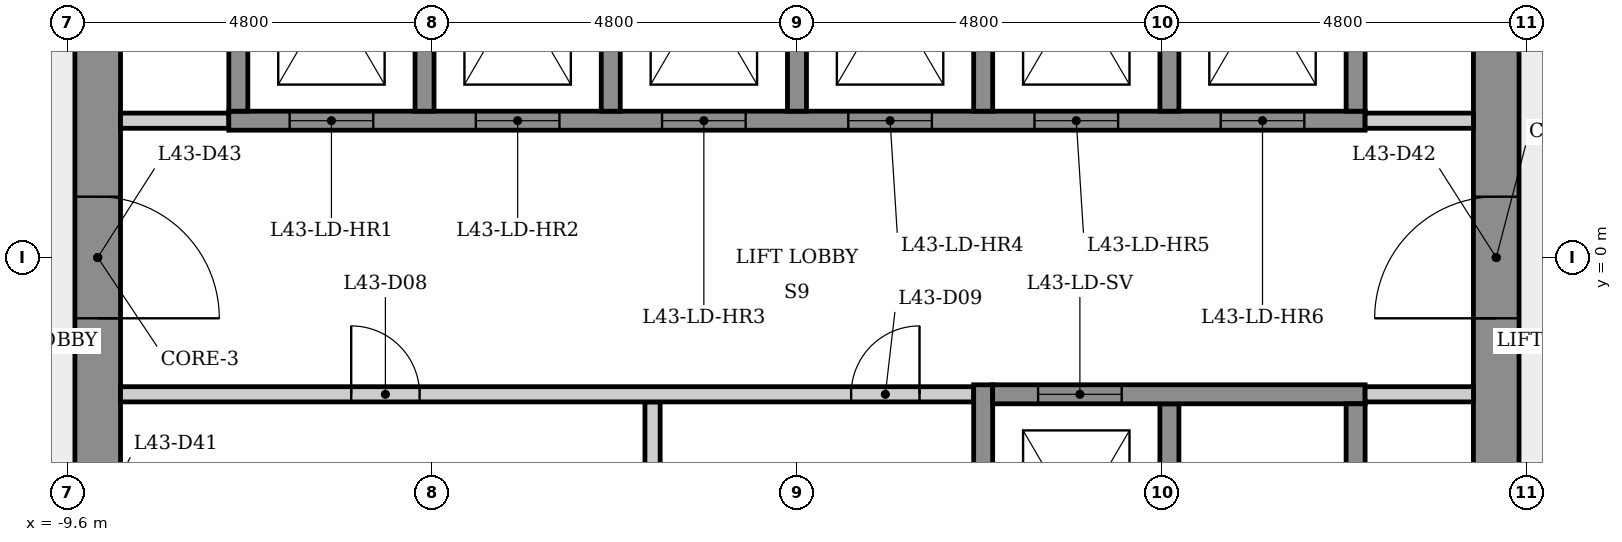
"""IFC4 building model, lengths in metres.
Left out: names, types, materials, properties, quantities, classifications, styles, units other than length and angle.
Written with IfcOpenShell. Run it as: python <this file> out.ifc"""

import sys

from ifc_helpers import new_model, si_unit, direction, frame, frame_2d, origin, place, context, subcontext, project, spatial, rectangle, extrude, element, fill, save


model = new_model("IFC4")
c1 = context("Model", 3, precision=1e-05, world=origin(), true_north=direction((0.0, 1.0)))
c2 = subcontext(c1, "Body", "Model", "MODEL_VIEW")
j1 = project(units=[si_unit("LENGTHUNIT", "METRE"), si_unit("PLANEANGLEUNIT", "RADIAN")], contexts=[c1])
p1 = place(None, origin())
s1 = spatial("IfcSite", under=j1, at=p1, CompositionType="ELEMENT")
p2 = place(p1, origin())
s2 = spatial("IfcBuilding", under=s1, at=p2, CompositionType="ELEMENT")
p3 = place(p2, frame((0.0, 0.0, 162.9)))
s3 = spatial("IfcBuildingStorey", under=s2, at=p3, CompositionType="ELEMENT", Elevation=162.9)
p4 = place(p3, frame((9.2, -5.485, 0.0), z_axis=(0.0, 0.0, 1.0), x_axis=(0.0, 1.0, 0.0)))
e1 = element("IfcWall", 1, at=p4, inside=s3, PredefinedType="SHEAR", context=c2, shape_type="SweptSolid", body=[
    extrude(rectangle(XDim=10.97, YDim=0.6, at=frame_2d((5.485, 0.0))), origin(), (0.0, 0.0, 1.0), 3.4),
])
p5 = place(p4, frame((4.685, 0.0, 0.0)))
e2 = element("IfcOpeningElement", 2, at=p5, cuts=e1, PredefinedType="OPENING", context=c2, shape_type="SweptSolid", body=[
    extrude(rectangle(XDim=1.6, YDim=2.1, at=frame_2d((0.8, 1.05))), frame((0.0, 0.31, 0.0), z_axis=(0.0, -1.0, 0.0), x_axis=(1.0, 0.0, 0.0)), (0.0, 0.0, 1.0), 0.62),
])
p6 = place(p3, frame((-9.2, 5.485, 0.0), z_axis=(0.0, 0.0, 1.0), x_axis=(0.0, -1.0, 0.0)))
e3 = element("IfcWall", 3, at=p6, inside=s3, PredefinedType="SHEAR", context=c2, shape_type="SweptSolid", body=[
    extrude(rectangle(XDim=10.97, YDim=0.6, at=frame_2d((5.485, 0.0))), origin(), (0.0, 0.0, 1.0), 3.4),
])
p7 = place(p6, frame((8.516, 0.0, 0.0)))
e4 = element("IfcOpeningElement", 4, at=p7, cuts=e3, PredefinedType="OPENING", context=c2, shape_type="SweptSolid", body=[
    extrude(rectangle(XDim=0.9, YDim=2.1, at=frame_2d((0.45, 1.05))), frame((0.0, 0.31, 0.0), z_axis=(0.0, -1.0, 0.0), x_axis=(1.0, 0.0, 0.0)), (0.0, 0.0, 1.0), 0.62),
])
p8 = place(p6, frame((4.685, 0.0, 0.0)))
e5 = element("IfcOpeningElement", 5, at=p8, cuts=e3, PredefinedType="OPENING", context=c2, shape_type="SweptSolid", body=[
    extrude(rectangle(XDim=1.6, YDim=2.1, at=frame_2d((0.8, 1.05))), frame((0.0, 0.31, 0.0), z_axis=(0.0, -1.0, 0.0), x_axis=(1.0, 0.0, 0.0)), (0.0, 0.0, 1.0), 0.62),
])
p9 = place(p3, frame((-8.9, 1.8, 0.0), z_axis=(0.0, 0.0, 1.0), x_axis=(1.0, 0.0, 0.0)))
e6 = element("IfcWall", 6, at=p9, inside=s3, PredefinedType="PARTITIONING", context=c2, shape_type="SweptSolid", body=[
    extrude(rectangle(XDim=1.425, YDim=0.2, at=frame_2d((0.712, 0.0))), origin(), (0.0, 0.0, 1.0), 3.05),
])
p10 = place(p3, frame((-7.475, 1.8, 0.0), z_axis=(0.0, 0.0, 1.0), x_axis=(1.0, 0.0, 0.0)))
e7 = element("IfcWall", 7, at=p10, inside=s3, PredefinedType="SHEAR", context=c2, shape_type="SweptSolid", body=[
    extrude(rectangle(XDim=14.95, YDim=0.25, at=frame_2d((7.475, 0.0))), origin(), (0.0, 0.0, 1.0), 3.05),
])
p11 = place(p10, frame((0.8, 0.0, 0.0)))
e8 = element("IfcOpeningElement", 8, at=p11, cuts=e7, PredefinedType="OPENING", context=c2, shape_type="SweptSolid", body=[
    extrude(rectangle(XDim=1.1, YDim=2.1, at=frame_2d((0.55, 1.05))), frame((0.0, 0.135, 0.0), z_axis=(0.0, -1.0, 0.0), x_axis=(1.0, 0.0, 0.0)), (0.0, 0.0, 1.0), 0.27),
])
p12 = place(p10, frame((3.25, 0.0, 0.0)))
e9 = element("IfcOpeningElement", 9, at=p12, cuts=e7, PredefinedType="OPENING", context=c2, shape_type="SweptSolid", body=[
    extrude(rectangle(XDim=1.1, YDim=2.1, at=frame_2d((0.55, 1.05))), frame((0.0, 0.135, 0.0), z_axis=(0.0, -1.0, 0.0), x_axis=(1.0, 0.0, 0.0)), (0.0, 0.0, 1.0), 0.27),
])
p13 = place(p10, frame((5.7, 0.0, 0.0)))
e10 = element("IfcOpeningElement", 10, at=p13, cuts=e7, PredefinedType="OPENING", context=c2, shape_type="SweptSolid", body=[
    extrude(rectangle(XDim=1.1, YDim=2.1, at=frame_2d((0.55, 1.05))), frame((0.0, 0.135, 0.0), z_axis=(0.0, -1.0, 0.0), x_axis=(1.0, 0.0, 0.0)), (0.0, 0.0, 1.0), 0.27),
])
p14 = place(p10, frame((8.15, 0.0, 0.0)))
e11 = element("IfcOpeningElement", 11, at=p14, cuts=e7, PredefinedType="OPENING", context=c2, shape_type="SweptSolid", body=[
    extrude(rectangle(XDim=1.1, YDim=2.1, at=frame_2d((0.55, 1.05))), frame((0.0, 0.135, 0.0), z_axis=(0.0, -1.0, 0.0), x_axis=(1.0, 0.0, 0.0)), (0.0, 0.0, 1.0), 0.27),
])
p15 = place(p10, frame((10.6, 0.0, 0.0)))
e12 = element("IfcOpeningElement", 12, at=p15, cuts=e7, PredefinedType="OPENING", context=c2, shape_type="SweptSolid", body=[
    extrude(rectangle(XDim=1.1, YDim=2.1, at=frame_2d((0.55, 1.05))), frame((0.0, 0.135, 0.0), z_axis=(0.0, -1.0, 0.0), x_axis=(1.0, 0.0, 0.0)), (0.0, 0.0, 1.0), 0.27),
])
p16 = place(p10, frame((13.05, 0.0, 0.0)))
e13 = element("IfcOpeningElement", 13, at=p16, cuts=e7, PredefinedType="OPENING", context=c2, shape_type="SweptSolid", body=[
    extrude(rectangle(XDim=1.1, YDim=2.1, at=frame_2d((0.55, 1.05))), frame((0.0, 0.135, 0.0), z_axis=(0.0, -1.0, 0.0), x_axis=(1.0, 0.0, 0.0)), (0.0, 0.0, 1.0), 0.27),
])
p17 = place(p3, frame((-7.35, 1.925, 0.0), z_axis=(0.0, 0.0, 1.0), x_axis=(0.0, 1.0, 0.0)))
e14 = element("IfcWall", 14, at=p17, inside=s3, PredefinedType="SHEAR", context=c2, shape_type="SweptSolid", body=[
    extrude(rectangle(XDim=4.036, YDim=0.25, at=frame_2d((2.018, 0.0))), origin(), (0.0, 0.0, 1.0), 3.05),
])
for number, where, z_axis, x_axis in (
    (15, (-4.9, 5.025, 0.0), (0.0, 0.0, 1.0), (0.0, -1.0, 0.0)),
    (16, (-2.45, 5.025, 0.0), (0.0, 0.0, 1.0), (0.0, -1.0, 0.0)),
):
    element("IfcWall", number, at=place(p3, frame(where, z_axis=z_axis, x_axis=x_axis)), inside=s3, PredefinedType="SHEAR", context=c2, shape_type="SweptSolid", body=[
        extrude(rectangle(XDim=3.1, YDim=0.25, at=frame_2d((1.55, 0.0))), origin(), (0.0, 0.0, 1.0), 3.4),
    ])
p18 = place(p3, frame((-1.9, -1.9, 0.0), z_axis=(0.0, 0.0, 1.0), x_axis=(0.0, -1.0, 0.0)))
e17 = element("IfcWall", 17, at=p18, inside=s3, PredefinedType="PARTITIONING", context=c2, shape_type="SweptSolid", body=[
    extrude(rectangle(XDim=3.15, YDim=0.2, at=frame_2d((1.575, 0.0))), origin(), (0.0, 0.0, 1.0), 3.05),
])
p19 = place(p3, frame((-8.9, -1.8, 0.0), z_axis=(0.0, 0.0, 1.0), x_axis=(1.0, 0.0, 0.0)))
e18 = element("IfcWall", 18, at=p19, inside=s3, PredefinedType="PARTITIONING", context=c2, shape_type="SweptSolid", body=[
    extrude(rectangle(XDim=11.225, YDim=0.2, at=frame_2d((5.613, 0.0))), origin(), (0.0, 0.0, 1.0), 3.05),
])
p20 = place(p19, frame((3.035, 0.0, 0.0)))
e19 = element("IfcOpeningElement", 19, at=p20, cuts=e18, PredefinedType="OPENING", context=c2, shape_type="SweptSolid", body=[
    extrude(rectangle(XDim=0.9, YDim=2.1, at=frame_2d((0.45, 1.05))), frame((0.0, 0.11, 0.0), z_axis=(0.0, -1.0, 0.0), x_axis=(1.0, 0.0, 0.0)), (0.0, 0.0, 1.0), 0.22),
])
p21 = place(p19, frame((9.613, 0.0, 0.0)))
e20 = element("IfcOpeningElement", 20, at=p21, cuts=e18, PredefinedType="OPENING", context=c2, shape_type="SweptSolid", body=[
    extrude(rectangle(XDim=0.9, YDim=2.1, at=frame_2d((0.45, 1.05))), frame((0.0, 0.11, 0.0), z_axis=(0.0, -1.0, 0.0), x_axis=(1.0, 0.0, 0.0)), (0.0, 0.0, 1.0), 0.22),
])
p22 = place(p3, frame((0.0, 5.025, 0.0), z_axis=(0.0, 0.0, 1.0), x_axis=(0.0, -1.0, 0.0)))
e21 = element("IfcWall", 21, at=p22, inside=s3, PredefinedType="SHEAR", context=c2, shape_type="SweptSolid", body=[
    extrude(rectangle(XDim=3.1, YDim=0.25, at=frame_2d((1.55, 0.0))), origin(), (0.0, 0.0, 1.0), 3.4),
])
p23 = place(p3, frame((2.45, -5.275, 0.0), z_axis=(0.0, 0.0, 1.0), x_axis=(0.0, 1.0, 0.0)))
e22 = element("IfcWall", 22, at=p23, inside=s3, PredefinedType="SHEAR", context=c2, shape_type="SweptSolid", body=[
    extrude(rectangle(XDim=3.6, YDim=0.25, at=frame_2d((1.8, 0.0))), origin(), (0.0, 0.0, 1.0), 3.05),
])
for number, where, z_axis, x_axis in (
    (23, (2.45, 5.025, 0.0), (0.0, 0.0, 1.0), (0.0, -1.0, 0.0)),
    (24, (4.9, -1.925, 0.0), (0.0, 0.0, 1.0), (0.0, -1.0, 0.0)),
    (25, (4.9, 5.025, 0.0), (0.0, 0.0, 1.0), (0.0, -1.0, 0.0)),
):
    element("IfcWall", number, at=place(p3, frame(where, z_axis=z_axis, x_axis=x_axis)), inside=s3, PredefinedType="SHEAR", context=c2, shape_type="SweptSolid", body=[
        extrude(rectangle(XDim=3.1, YDim=0.25, at=frame_2d((1.55, 0.0))), origin(), (0.0, 0.0, 1.0), 3.4),
    ])
p24 = place(p3, frame((2.575, -1.8, 0.0), z_axis=(0.0, 0.0, 1.0), x_axis=(1.0, 0.0, 0.0)))
e26 = element("IfcWall", 26, at=p24, inside=s3, PredefinedType="SHEAR", context=c2, shape_type="SweptSolid", body=[
    extrude(rectangle(XDim=4.9, YDim=0.25, at=frame_2d((2.45, 0.0))), origin(), (0.0, 0.0, 1.0), 3.05),
])
p25 = place(p24, frame((0.597, 0.0, 0.0)))
e27 = element("IfcOpeningElement", 27, at=p25, cuts=e26, PredefinedType="OPENING", context=c2, shape_type="SweptSolid", body=[
    extrude(rectangle(XDim=1.1, YDim=2.1, at=frame_2d((0.55, 1.05))), frame((0.0, 0.135, 0.0), z_axis=(0.0, -1.0, 0.0), x_axis=(1.0, 0.0, 0.0)), (0.0, 0.0, 1.0), 0.27),
])
p26 = place(p3, frame((7.475, 1.8, 0.0), z_axis=(0.0, 0.0, 1.0), x_axis=(1.0, 0.0, 0.0)))
e28 = element("IfcWall", 28, at=p26, inside=s3, PredefinedType="PARTITIONING", context=c2, shape_type="SweptSolid", body=[
    extrude(rectangle(XDim=1.425, YDim=0.2, at=frame_2d((0.712, 0.0))), origin(), (0.0, 0.0, 1.0), 3.05),
])
for number, where, z_axis, x_axis in (
    (29, (7.35, -1.925, 0.0), (0.0, 0.0, 1.0), (0.0, -1.0, 0.0)),
    (30, (7.35, 5.025, 0.0), (0.0, 0.0, 1.0), (0.0, -1.0, 0.0)),
):
    element("IfcWall", number, at=place(p3, frame(where, z_axis=z_axis, x_axis=x_axis)), inside=s3, PredefinedType="SHEAR", context=c2, shape_type="SweptSolid", body=[
        extrude(rectangle(XDim=3.1, YDim=0.25, at=frame_2d((1.55, 0.0))), origin(), (0.0, 0.0, 1.0), 3.4),
    ])
p27 = place(p3, frame((8.9, -1.8, 0.0), z_axis=(0.0, 0.0, 1.0), x_axis=(-1.0, 0.0, 0.0)))
e31 = element("IfcWall", 31, at=p27, inside=s3, PredefinedType="PARTITIONING", context=c2, shape_type="SweptSolid", body=[
    extrude(rectangle(XDim=1.425, YDim=0.2, at=frame_2d((0.712, 0.0))), origin(), (0.0, 0.0, 1.0), 3.05),
])
p28 = place(p11, origin())
e32 = element("IfcDoor", 32, at=p28, inside=s3, OperationType="SLIDING_TO_LEFT", PredefinedType="DOOR", context=c2, shape_type="SweptSolid", body=[
    extrude(rectangle(XDim=1.1, YDim=2.1, at=frame_2d((0.55, 1.05))), frame((0.0, 0.025, 0.0), z_axis=(0.0, -1.0, 0.0), x_axis=(1.0, 0.0, 0.0)), (0.0, 0.0, 1.0), 0.05),
])
fill(e8, e32)
p29 = place(p12, origin())
e33 = element("IfcDoor", 33, at=p29, inside=s3, OperationType="SLIDING_TO_LEFT", PredefinedType="DOOR", context=c2, shape_type="SweptSolid", body=[
    extrude(rectangle(XDim=1.1, YDim=2.1, at=frame_2d((0.55, 1.05))), frame((0.0, 0.025, 0.0), z_axis=(0.0, -1.0, 0.0), x_axis=(1.0, 0.0, 0.0)), (0.0, 0.0, 1.0), 0.05),
])
fill(e9, e33)
p30 = place(p13, origin())
e34 = element("IfcDoor", 34, at=p30, inside=s3, OperationType="SLIDING_TO_LEFT", PredefinedType="DOOR", context=c2, shape_type="SweptSolid", body=[
    extrude(rectangle(XDim=1.1, YDim=2.1, at=frame_2d((0.55, 1.05))), frame((0.0, 0.025, 0.0), z_axis=(0.0, -1.0, 0.0), x_axis=(1.0, 0.0, 0.0)), (0.0, 0.0, 1.0), 0.05),
])
fill(e10, e34)
p31 = place(p14, origin())
e35 = element("IfcDoor", 35, at=p31, inside=s3, OperationType="SLIDING_TO_LEFT", PredefinedType="DOOR", context=c2, shape_type="SweptSolid", body=[
    extrude(rectangle(XDim=1.1, YDim=2.1, at=frame_2d((0.55, 1.05))), frame((0.0, 0.025, 0.0), z_axis=(0.0, -1.0, 0.0), x_axis=(1.0, 0.0, 0.0)), (0.0, 0.0, 1.0), 0.05),
])
fill(e11, e35)
p32 = place(p15, origin())
e36 = element("IfcDoor", 36, at=p32, inside=s3, OperationType="SLIDING_TO_LEFT", PredefinedType="DOOR", context=c2, shape_type="SweptSolid", body=[
    extrude(rectangle(XDim=1.1, YDim=2.1, at=frame_2d((0.55, 1.05))), frame((0.0, 0.025, 0.0), z_axis=(0.0, -1.0, 0.0), x_axis=(1.0, 0.0, 0.0)), (0.0, 0.0, 1.0), 0.05),
])
fill(e12, e36)
p33 = place(p16, origin())
e37 = element("IfcDoor", 37, at=p33, inside=s3, OperationType="SLIDING_TO_LEFT", PredefinedType="DOOR", context=c2, shape_type="SweptSolid", body=[
    extrude(rectangle(XDim=1.1, YDim=2.1, at=frame_2d((0.55, 1.05))), frame((0.0, 0.025, 0.0), z_axis=(0.0, -1.0, 0.0), x_axis=(1.0, 0.0, 0.0)), (0.0, 0.0, 1.0), 0.05),
])
fill(e13, e37)
p34 = place(p25, origin())
e38 = element("IfcDoor", 38, at=p34, inside=s3, OperationType="SLIDING_TO_LEFT", PredefinedType="DOOR", context=c2, shape_type="SweptSolid", body=[
    extrude(rectangle(XDim=1.1, YDim=2.1, at=frame_2d((0.55, 1.05))), frame((0.0, 0.025, 0.0), z_axis=(0.0, -1.0, 0.0), x_axis=(1.0, 0.0, 0.0)), (0.0, 0.0, 1.0), 0.05),
])
fill(e27, e38)
p35 = place(p20, origin())
e39 = element("IfcDoor", 39, at=p35, inside=s3, OperationType="SINGLE_SWING_LEFT", PredefinedType="DOOR", context=c2, shape_type="SweptSolid", body=[
    extrude(rectangle(XDim=0.9, YDim=2.1, at=frame_2d((0.45, 1.05))), frame((0.0, 0.025, 0.0), z_axis=(0.0, -1.0, 0.0), x_axis=(1.0, 0.0, 0.0)), (0.0, 0.0, 1.0), 0.05),
])
fill(e19, e39)
p36 = place(p21, origin())
e40 = element("IfcDoor", 40, at=p36, inside=s3, OperationType="SINGLE_SWING_RIGHT", PredefinedType="DOOR", context=c2, shape_type="SweptSolid", body=[
    extrude(rectangle(XDim=0.9, YDim=2.1, at=frame_2d((0.45, 1.05))), frame((0.0, 0.025, 0.0), z_axis=(0.0, -1.0, 0.0), x_axis=(1.0, 0.0, 0.0)), (0.0, 0.0, 1.0), 0.05),
])
fill(e20, e40)
p37 = place(p5, origin())
e41 = element("IfcDoor", 41, at=p37, inside=s3, OperationType="SINGLE_SWING_LEFT", PredefinedType="DOOR", context=c2, shape_type="SweptSolid", body=[
    extrude(rectangle(XDim=1.6, YDim=2.1, at=frame_2d((0.8, 1.05))), frame((0.0, 0.025, 0.0), z_axis=(0.0, -1.0, 0.0), x_axis=(1.0, 0.0, 0.0)), (0.0, 0.0, 1.0), 0.05),
])
fill(e2, e41)
p38 = place(p8, origin())
e42 = element("IfcDoor", 42, at=p38, inside=s3, OperationType="SINGLE_SWING_RIGHT", PredefinedType="DOOR", context=c2, shape_type="SweptSolid", body=[
    extrude(rectangle(XDim=1.6, YDim=2.1, at=frame_2d((0.8, 1.05))), frame((0.0, 0.025, 0.0), z_axis=(0.0, -1.0, 0.0), x_axis=(1.0, 0.0, 0.0)), (0.0, 0.0, 1.0), 0.05),
])
fill(e5, e42)
save(model, sys.argv[1])
